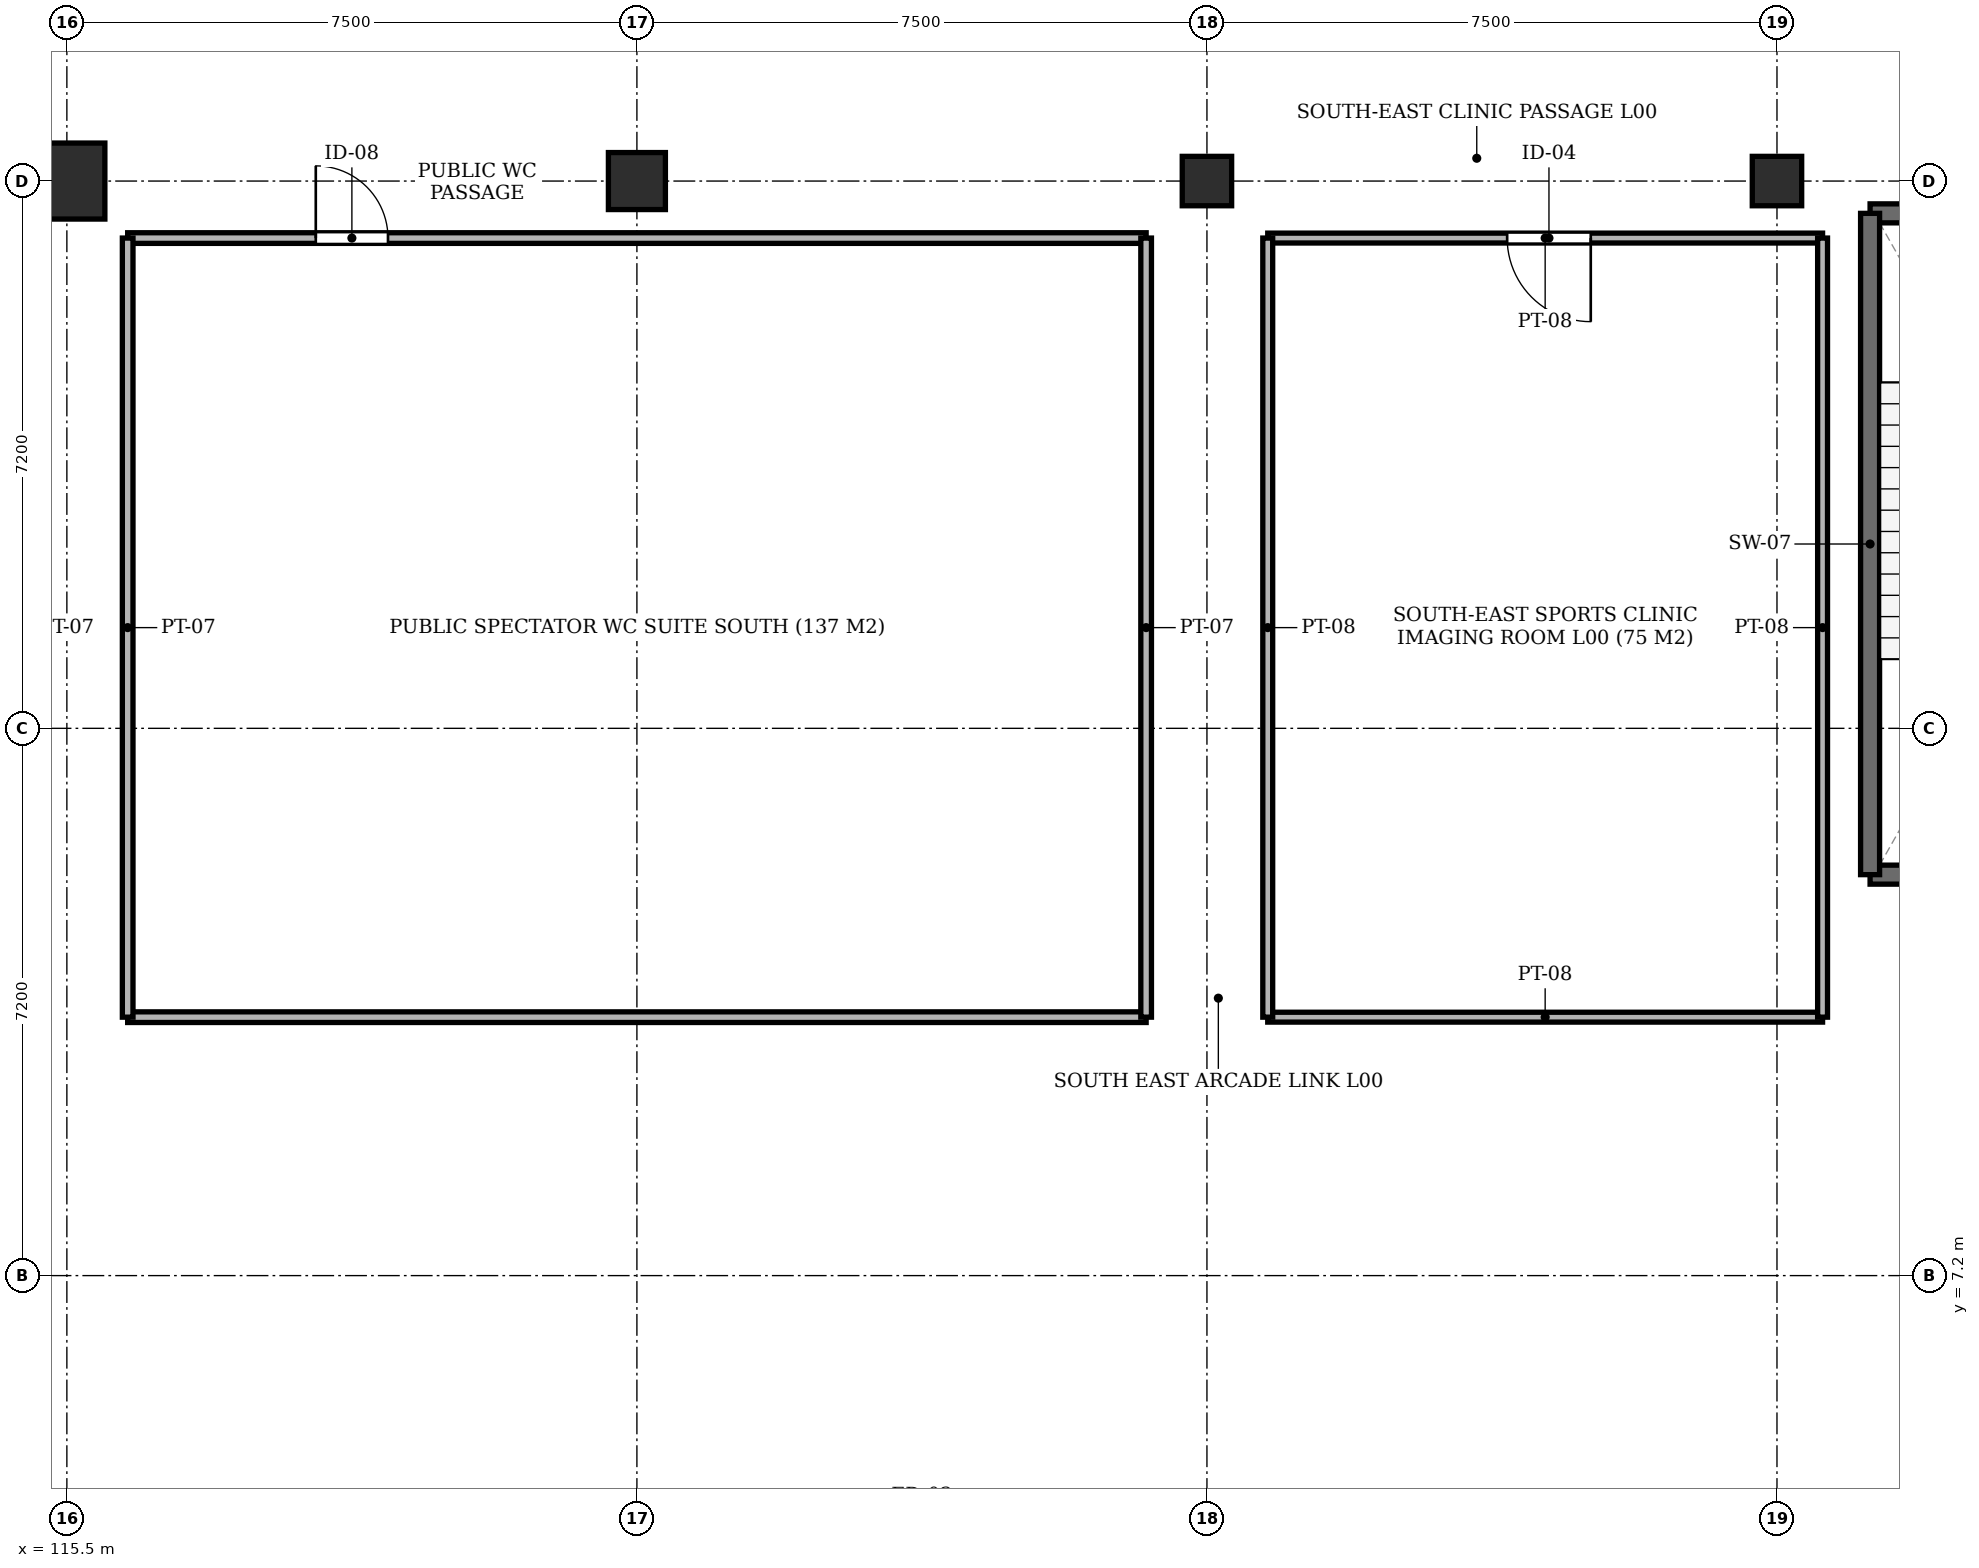
"""IFC4 building model, lengths in metres.
Left out: names, types, materials, properties, quantities, classifications, styles, units other than length and angle.
Written with IfcOpenShell. Run it as: python <this file> out.ifc"""

import sys

from ifc_helpers import new_model, si_unit, direction, frame, frame_2d, origin, origin_2d, place, context, subcontext, project, spatial, rectangle, extrude, element, fill, save


model = new_model("IFC4")
c1 = context("Model", 3, precision=1e-05, world=origin(), true_north=direction((0.0, 1.0)))
c2 = subcontext(c1, "Body", "Model", "MODEL_VIEW")
j1 = project(units=[si_unit("LENGTHUNIT", "METRE"), si_unit("PLANEANGLEUNIT", "RADIAN")], contexts=[c1])
p1 = place(None, origin())
s1 = spatial("IfcSite", under=j1, at=p1, CompositionType="ELEMENT")
p2 = place(p1, origin())
s2 = spatial("IfcBuilding", under=s1, at=p2, CompositionType="ELEMENT")
p3 = place(p2, origin())
s3 = spatial("IfcBuildingStorey", under=s2, at=p3, CompositionType="ELEMENT", Elevation=0.0)
p4 = place(p3, frame((115.5, 21.6, -0.35), z_axis=(0.0, 0.0, 1.0), x_axis=(1.0, 0.0, 0.0)))
e1 = element("IfcColumn", 1, at=p4, inside=s3, PredefinedType="COLUMN", context=c2, shape_type="SweptSolid", body=[
    extrude(rectangle(XDim=1.0, YDim=1.0, at=origin_2d()), origin(), (0.0, 0.0, 1.0), 4.65),
])
p5 = place(p3, frame((123.0, 21.6, -0.35), z_axis=(0.0, 0.0, 1.0), x_axis=(1.0, 0.0, 0.0)))
e2 = element("IfcColumn", 2, at=p5, inside=s3, PredefinedType="COLUMN", context=c2, shape_type="SweptSolid", body=[
    extrude(rectangle(XDim=0.75, YDim=0.75, at=origin_2d()), origin(), (0.0, 0.0, 1.0), 4.65),
])
for number, where, z_axis, x_axis in (
    (3, (130.5, 21.6, -0.35), (0.0, 0.0, 1.0), (1.0, 0.0, 0.0)),
    (4, (138.0, 21.6, -0.35), (0.0, 0.0, 1.0), (1.0, 0.0, 0.0)),
):
    element("IfcColumn", number, at=place(p3, frame(where, z_axis=z_axis, x_axis=x_axis)), inside=s3, PredefinedType="COLUMN", context=c2, shape_type="SweptSolid", body=[
        extrude(rectangle(XDim=0.65, YDim=0.65, at=origin_2d()), origin(), (0.0, 0.0, 1.0), 4.65),
    ])
p6 = place(p3, frame((139.225, 12.475, 0.0), z_axis=(0.0, 0.0, 1.0), x_axis=(1.0, 0.0, 0.0)))
e5 = element("IfcWall", 5, at=p6, inside=s3, PredefinedType="SHEAR", context=c2, shape_type="SweptSolid", body=[
    extrude(rectangle(XDim=5.05, YDim=0.25, at=frame_2d((2.525, 0.0))), origin(), (0.0, 0.0, 1.0), 4.3),
])
p7 = place(p3, frame((144.275, 21.175, 0.0), z_axis=(0.0, 0.0, 1.0), x_axis=(-1.0, 0.0, 0.0)))
e6 = element("IfcWall", 6, at=p7, inside=s3, PredefinedType="SHEAR", context=c2, shape_type="SweptSolid", body=[
    extrude(rectangle(XDim=5.05, YDim=0.25, at=frame_2d((2.525, 0.0))), origin(), (0.0, 0.0, 1.0), 4.3),
])
p8 = place(p7, frame((1.875, 0.0, 0.0)))
e7 = element("IfcOpeningElement", 7, at=p8, cuts=e6, PredefinedType="OPENING", context=c2, shape_type="SweptSolid", body=[
    extrude(rectangle(XDim=1.3, YDim=2.2, at=frame_2d((0.65, 1.1))), frame((0.0, 0.137, 0.0), z_axis=(0.0, -1.0, 0.0), x_axis=(1.0, 0.0, 0.0)), (0.0, 0.0, 1.0), 0.274),
])
p9 = place(p3, frame((139.225, 21.175, 0.0), z_axis=(0.0, 0.0, 1.0), x_axis=(0.0, -1.0, 0.0)))
e8 = element("IfcWall", 8, at=p9, inside=s3, PredefinedType="SHEAR", context=c2, shape_type="SweptSolid", body=[
    extrude(rectangle(XDim=8.7, YDim=0.25, at=frame_2d((4.35, 0.0))), origin(), (0.0, 0.0, 1.0), 4.3),
])
p10 = place(p3, frame((116.3, 10.6, 0.0), z_axis=(0.0, 0.0, 1.0), x_axis=(1.0, 0.0, 0.0)))
e9 = element("IfcWall", 9, at=p10, inside=s3, PredefinedType="PARTITIONING", context=c2, shape_type="SweptSolid", body=[
    extrude(rectangle(XDim=13.4, YDim=0.14, at=frame_2d((6.7, 0.0))), origin(), (0.0, 0.0, 1.0), 3.88),
])
p11 = place(p3, frame((116.3, 20.85, 0.0), z_axis=(0.0, 0.0, 1.0), x_axis=(1.0, 0.0, 0.0)))
e10 = element("IfcWall", 10, at=p11, inside=s3, PredefinedType="PARTITIONING", context=c2, shape_type="SweptSolid", body=[
    extrude(rectangle(XDim=13.4, YDim=0.14, at=frame_2d((6.7, 0.0))), origin(), (0.0, 0.0, 1.0), 3.88),
])
p12 = place(p11, frame((2.475, 0.0, 0.0)))
e11 = element("IfcOpeningElement", 11, at=p12, cuts=e10, PredefinedType="OPENING", context=c2, shape_type="SweptSolid", body=[
    extrude(rectangle(XDim=0.95, YDim=2.1, at=frame_2d((0.475, 1.05))), frame((0.0, 0.082, 0.0), z_axis=(0.0, -1.0, 0.0), x_axis=(1.0, 0.0, 0.0)), (0.0, 0.0, 1.0), 0.164),
])
for number, where, z_axis, x_axis in (
    (12, (116.3, 10.6, 0.0), (0.0, 0.0, 1.0), (0.0, 1.0, 0.0)),
    (13, (129.7, 10.6, 0.0), (0.0, 0.0, 1.0), (0.0, 1.0, 0.0)),
):
    element("IfcWall", number, at=place(p3, frame(where, z_axis=z_axis, x_axis=x_axis)), inside=s3, PredefinedType="PARTITIONING", context=c2, shape_type="SweptSolid", body=[
        extrude(rectangle(XDim=10.25, YDim=0.14, at=frame_2d((5.125, 0.0))), origin(), (0.0, 0.0, 1.0), 3.88),
    ])
p13 = place(p3, frame((131.3, 10.6, 0.0), z_axis=(0.0, 0.0, 1.0), x_axis=(1.0, 0.0, 0.0)))
e14 = element("IfcWall", 14, at=p13, inside=s3, PredefinedType="PARTITIONING", context=c2, shape_type="SweptSolid", body=[
    extrude(rectangle(XDim=7.3, YDim=0.13, at=frame_2d((3.65, 0.0))), origin(), (0.0, 0.0, 1.0), 3.88),
])
p14 = place(p3, frame((131.3, 20.85, 0.0), z_axis=(0.0, 0.0, 1.0), x_axis=(1.0, 0.0, 0.0)))
e15 = element("IfcWall", 15, at=p14, inside=s3, PredefinedType="PARTITIONING", context=c2, shape_type="SweptSolid", body=[
    extrude(rectangle(XDim=7.3, YDim=0.13, at=frame_2d((3.65, 0.0))), origin(), (0.0, 0.0, 1.0), 3.88),
])
p15 = place(p14, frame((3.15, 0.0, 0.0)))
e16 = element("IfcOpeningElement", 16, at=p15, cuts=e15, PredefinedType="OPENING", context=c2, shape_type="SweptSolid", body=[
    extrude(rectangle(XDim=1.1, YDim=2.15, at=frame_2d((0.55, 1.075))), frame((0.0, 0.077, 0.0), z_axis=(0.0, -1.0, 0.0), x_axis=(1.0, 0.0, 0.0)), (0.0, 0.0, 1.0), 0.154),
])
for number, where, z_axis, x_axis in (
    (17, (131.3, 10.6, 0.0), (0.0, 0.0, 1.0), (0.0, 1.0, 0.0)),
    (18, (138.6, 10.6, 0.0), (0.0, 0.0, 1.0), (0.0, 1.0, 0.0)),
):
    element("IfcWall", number, at=place(p3, frame(where, z_axis=z_axis, x_axis=x_axis)), inside=s3, PredefinedType="PARTITIONING", context=c2, shape_type="SweptSolid", body=[
        extrude(rectangle(XDim=10.25, YDim=0.13, at=frame_2d((5.125, 0.0))), origin(), (0.0, 0.0, 1.0), 3.88),
    ])
p16 = place(p12, origin())
e19 = element("IfcDoor", 19, at=p16, inside=s3, OperationType="SINGLE_SWING_LEFT", PredefinedType="DOOR", context=c2, shape_type="SweptSolid", body=[
    extrude(rectangle(XDim=0.95, YDim=2.1, at=frame_2d((0.475, 1.05))), frame((0.0, 0.025, 0.0), z_axis=(0.0, -1.0, 0.0), x_axis=(1.0, 0.0, 0.0)), (0.0, 0.0, 1.0), 0.05),
])
fill(e11, e19)
p17 = place(p15, frame((1.1, 0.0, 0.0), z_axis=(0.0, 0.0, 1.0), x_axis=(-1.0, 0.0, 0.0)))
e20 = element("IfcDoor", 20, at=p17, inside=s3, OperationType="SINGLE_SWING_RIGHT", PredefinedType="DOOR", context=c2, shape_type="SweptSolid", body=[
    extrude(rectangle(XDim=1.1, YDim=2.15, at=frame_2d((0.55, 1.075))), frame((0.0, 0.025, 0.0), z_axis=(0.0, -1.0, 0.0), x_axis=(1.0, 0.0, 0.0)), (0.0, 0.0, 1.0), 0.05),
])
fill(e16, e20)
save(model, sys.argv[1])
